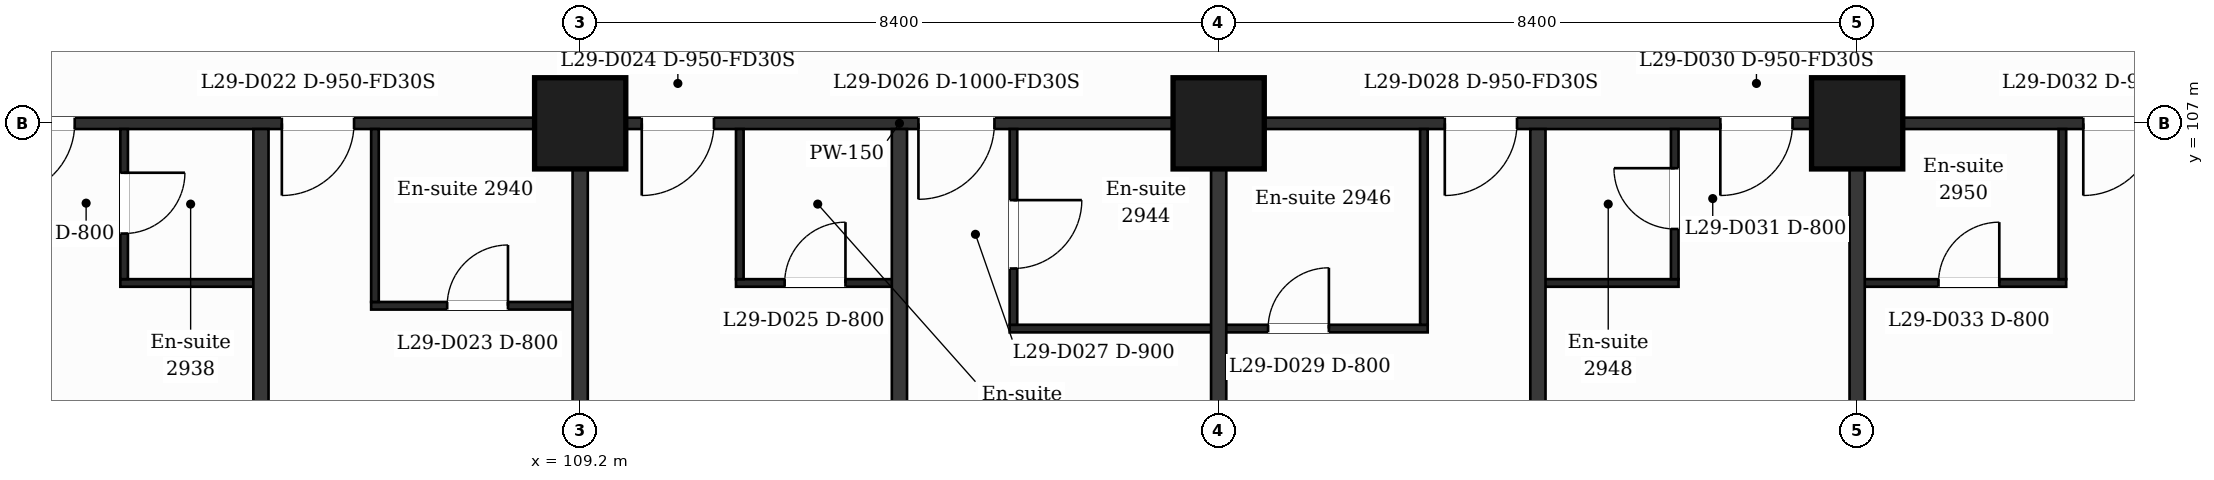
"""IFC4 building model, lengths in metres.
Left out: names, types, materials, properties, quantities, classifications, styles, units other than length and angle.
Written with IfcOpenShell. Run it as: python <this file> out.ifc"""

import sys

from ifc_helpers import new_model, si_unit, direction, frame, frame_2d, origin, origin_2d, place, context, subcontext, project, spatial, rectangle, extrude, element, fill, save


model = new_model("IFC4")
c1 = context("Model", 3, precision=1e-05, world=origin(), true_north=direction((0.0, 1.0)))
c2 = subcontext(c1, "Body", "Model", "MODEL_VIEW")
j1 = project(units=[si_unit("LENGTHUNIT", "METRE"), si_unit("PLANEANGLEUNIT", "RADIAN")], contexts=[c1])
p1 = place(None, origin())
s1 = spatial("IfcSite", under=j1, at=p1, CompositionType="ELEMENT")
p2 = place(p1, origin())
s2 = spatial("IfcBuilding", under=s1, at=p2, CompositionType="ELEMENT")
p3 = place(p2, frame((0.0, 0.0, 124.3)))
s3 = spatial("IfcBuildingStorey", under=s2, at=p3, CompositionType="ELEMENT", Elevation=124.3)
for number, where, z_axis, x_axis in (
    (1, (109.2, 107.0, 0.0), (0.0, 0.0, 1.0), (1.0, 0.0, 0.0)),
    (2, (117.6, 107.0, 0.0), (0.0, 0.0, 1.0), (1.0, 0.0, 0.0)),
    (3, (126.0, 107.0, 0.0), (0.0, 0.0, 1.0), (1.0, 0.0, 0.0)),
):
    element("IfcColumn", number, at=place(p3, frame(where, z_axis=z_axis, x_axis=x_axis)), inside=s3, PredefinedType="COLUMN", context=c2, shape_type="SweptSolid", body=[
        extrude(rectangle(XDim=1.2, YDim=1.2, at=origin_2d()), origin(), (0.0, 0.0, 1.0), 3.7),
    ])
p4 = place(p3, frame((114.85, 104.3, 0.0), z_axis=(0.0, 0.0, 1.0), x_axis=(1.0, 0.0, 0.0)))
e4 = element("IfcWall", 4, at=p4, inside=s3, PredefinedType="PARTITIONING", context=c2, shape_type="SweptSolid", body=[
    extrude(rectangle(XDim=5.5, YDim=0.1, at=frame_2d((2.75, 0.0))), origin(), (0.0, 0.0, 1.0), 3.38),
])
p5 = place(p4, frame((3.4, 0.0, 0.0)))
e5 = element("IfcOpeningElement", 5, at=p5, cuts=e4, PredefinedType="OPENING", context=c2, shape_type="SweptSolid", body=[
    extrude(rectangle(XDim=0.8, YDim=2.1, at=frame_2d((0.4, 1.05))), frame((0.0, 0.06, 0.0), z_axis=(0.0, -1.0, 0.0), x_axis=(1.0, 0.0, 0.0)), (0.0, 0.0, 1.0), 0.12),
])
p6 = place(p3, frame((106.45, 104.6, 0.0), z_axis=(0.0, 0.0, 1.0), x_axis=(1.0, 0.0, 0.0)))
e6 = element("IfcWall", 6, at=p6, inside=s3, PredefinedType="PARTITIONING", context=c2, shape_type="SweptSolid", body=[
    extrude(rectangle(XDim=2.75, YDim=0.1, at=frame_2d((1.375, 0.0))), origin(), (0.0, 0.0, 1.0), 3.38),
])
p7 = place(p6, frame((1.0, 0.0, 0.0)))
e7 = element("IfcOpeningElement", 7, at=p7, cuts=e6, PredefinedType="OPENING", context=c2, shape_type="SweptSolid", body=[
    extrude(rectangle(XDim=0.8, YDim=2.1, at=frame_2d((0.4, 1.05))), frame((0.0, 0.06, 0.0), z_axis=(0.0, -1.0, 0.0), x_axis=(1.0, 0.0, 0.0)), (0.0, 0.0, 1.0), 0.12),
])
p8 = place(p3, frame((103.15, 104.9, 0.0), z_axis=(0.0, 0.0, 1.0), x_axis=(1.0, 0.0, 0.0)))
e8 = element("IfcWall", 8, at=p8, inside=s3, PredefinedType="PARTITIONING", context=c2, shape_type="SweptSolid", body=[
    extrude(rectangle(XDim=1.85, YDim=0.1, at=frame_2d((0.925, 0.0))), origin(), (0.0, 0.0, 1.0), 3.38),
])
p9 = place(p3, frame((111.25, 104.9, 0.0), z_axis=(0.0, 0.0, 1.0), x_axis=(1.0, 0.0, 0.0)))
e9 = element("IfcWall", 9, at=p9, inside=s3, PredefinedType="PARTITIONING", context=c2, shape_type="SweptSolid", body=[
    extrude(rectangle(XDim=2.15, YDim=0.1, at=frame_2d((1.075, 0.0))), origin(), (0.0, 0.0, 1.0), 3.38),
])
p10 = place(p9, frame((0.64, 0.0, 0.0)))
e10 = element("IfcOpeningElement", 10, at=p10, cuts=e9, PredefinedType="OPENING", context=c2, shape_type="SweptSolid", body=[
    extrude(rectangle(XDim=0.8, YDim=2.1, at=frame_2d((0.4, 1.05))), frame((0.0, 0.06, 0.0), z_axis=(0.0, -1.0, 0.0), x_axis=(1.0, 0.0, 0.0)), (0.0, 0.0, 1.0), 0.12),
])
p11 = place(p3, frame((121.8, 104.9, 0.0), z_axis=(0.0, 0.0, 1.0), x_axis=(1.0, 0.0, 0.0)))
e11 = element("IfcWall", 11, at=p11, inside=s3, PredefinedType="PARTITIONING", context=c2, shape_type="SweptSolid", body=[
    extrude(rectangle(XDim=1.85, YDim=0.1, at=frame_2d((0.925, 0.0))), origin(), (0.0, 0.0, 1.0), 3.38),
])
p12 = place(p3, frame((126.0, 104.9, 0.0), z_axis=(0.0, 0.0, 1.0), x_axis=(1.0, 0.0, 0.0)))
e12 = element("IfcWall", 12, at=p12, inside=s3, PredefinedType="PARTITIONING", context=c2, shape_type="SweptSolid", body=[
    extrude(rectangle(XDim=2.75, YDim=0.1, at=frame_2d((1.375, 0.0))), origin(), (0.0, 0.0, 1.0), 3.38),
])
p13 = place(p12, frame((1.07, 0.0, 0.0)))
e13 = element("IfcOpeningElement", 13, at=p13, cuts=e12, PredefinedType="OPENING", context=c2, shape_type="SweptSolid", body=[
    extrude(rectangle(XDim=0.8, YDim=2.1, at=frame_2d((0.4, 1.05))), frame((0.0, 0.06, 0.0), z_axis=(0.0, -1.0, 0.0), x_axis=(1.0, 0.0, 0.0)), (0.0, 0.0, 1.0), 0.12),
])
p14 = place(p3, frame((87.018, 107.0, 0.0), z_axis=(0.0, 0.0, 1.0), x_axis=(1.0, 0.0, 0.0)))
e14 = element("IfcWall", 14, at=p14, inside=s3, PredefinedType="PARTITIONING", context=c2, shape_type="SweptSolid", body=[
    extrude(rectangle(XDim=52.765, YDim=0.15, at=frame_2d((26.382, 0.0))), origin(), (0.0, 0.0, 1.0), 3.38),
])
p15 = place(p14, frame((1.276, 0.0, 0.0)))
e15 = element("IfcOpeningElement", 15, at=p15, cuts=e14, PredefinedType="OPENING", context=c2, shape_type="SweptSolid", body=[
    extrude(rectangle(XDim=0.95, YDim=2.1, at=frame_2d((0.475, 1.05))), frame((0.0, 0.085, 0.0), z_axis=(0.0, -1.0, 0.0), x_axis=(1.0, 0.0, 0.0)), (0.0, 0.0, 1.0), 0.17),
])
p16 = place(p14, frame((6.192, 0.0, 0.0)))
e16 = element("IfcOpeningElement", 16, at=p16, cuts=e14, PredefinedType="OPENING", context=c2, shape_type="SweptSolid", body=[
    extrude(rectangle(XDim=0.95, YDim=2.1, at=frame_2d((0.475, 1.05))), frame((0.0, 0.085, 0.0), z_axis=(0.0, -1.0, 0.0), x_axis=(1.0, 0.0, 0.0)), (0.0, 0.0, 1.0), 0.17),
])
p17 = place(p14, frame((11.982, 0.0, 0.0)))
e17 = element("IfcOpeningElement", 17, at=p17, cuts=e14, PredefinedType="OPENING", context=c2, shape_type="SweptSolid", body=[
    extrude(rectangle(XDim=1.0, YDim=2.1, at=frame_2d((0.5, 1.05))), frame((0.0, 0.085, 0.0), z_axis=(0.0, -1.0, 0.0), x_axis=(1.0, 0.0, 0.0)), (0.0, 0.0, 1.0), 0.17),
])
p18 = place(p14, frame((14.582, 0.0, 0.0)))
e18 = element("IfcOpeningElement", 18, at=p18, cuts=e14, PredefinedType="OPENING", context=c2, shape_type="SweptSolid", body=[
    extrude(rectangle(XDim=0.95, YDim=2.1, at=frame_2d((0.475, 1.05))), frame((0.0, 0.085, 0.0), z_axis=(0.0, -1.0, 0.0), x_axis=(1.0, 0.0, 0.0)), (0.0, 0.0, 1.0), 0.17),
])
p19 = place(p14, frame((18.257, 0.0, 0.0)))
e19 = element("IfcOpeningElement", 19, at=p19, cuts=e14, PredefinedType="OPENING", context=c2, shape_type="SweptSolid", body=[
    extrude(rectangle(XDim=0.95, YDim=2.1, at=frame_2d((0.475, 1.05))), frame((0.0, 0.085, 0.0), z_axis=(0.0, -1.0, 0.0), x_axis=(1.0, 0.0, 0.0)), (0.0, 0.0, 1.0), 0.17),
])
p20 = place(p14, frame((22.992, 0.0, 0.0)))
e20 = element("IfcOpeningElement", 20, at=p20, cuts=e14, PredefinedType="OPENING", context=c2, shape_type="SweptSolid", body=[
    extrude(rectangle(XDim=0.95, YDim=2.1, at=frame_2d((0.475, 1.05))), frame((0.0, 0.085, 0.0), z_axis=(0.0, -1.0, 0.0), x_axis=(1.0, 0.0, 0.0)), (0.0, 0.0, 1.0), 0.17),
])
p21 = place(p14, frame((26.632, 0.0, 0.0)))
e21 = element("IfcOpeningElement", 21, at=p21, cuts=e14, PredefinedType="OPENING", context=c2, shape_type="SweptSolid", body=[
    extrude(rectangle(XDim=1.0, YDim=2.1, at=frame_2d((0.5, 1.05))), frame((0.0, 0.085, 0.0), z_axis=(0.0, -1.0, 0.0), x_axis=(1.0, 0.0, 0.0)), (0.0, 0.0, 1.0), 0.17),
])
p22 = place(p14, frame((33.557, 0.0, 0.0)))
e22 = element("IfcOpeningElement", 22, at=p22, cuts=e14, PredefinedType="OPENING", context=c2, shape_type="SweptSolid", body=[
    extrude(rectangle(XDim=0.95, YDim=2.1, at=frame_2d((0.475, 1.05))), frame((0.0, 0.085, 0.0), z_axis=(0.0, -1.0, 0.0), x_axis=(1.0, 0.0, 0.0)), (0.0, 0.0, 1.0), 0.17),
])
p23 = place(p14, frame((37.182, 0.0, 0.0)))
e23 = element("IfcOpeningElement", 23, at=p23, cuts=e14, PredefinedType="OPENING", context=c2, shape_type="SweptSolid", body=[
    extrude(rectangle(XDim=0.95, YDim=2.1, at=frame_2d((0.475, 1.05))), frame((0.0, 0.085, 0.0), z_axis=(0.0, -1.0, 0.0), x_axis=(1.0, 0.0, 0.0)), (0.0, 0.0, 1.0), 0.17),
])
p24 = place(p14, frame((41.957, 0.0, 0.0)))
e24 = element("IfcOpeningElement", 24, at=p24, cuts=e14, PredefinedType="OPENING", context=c2, shape_type="SweptSolid", body=[
    extrude(rectangle(XDim=0.95, YDim=2.1, at=frame_2d((0.475, 1.05))), frame((0.0, 0.085, 0.0), z_axis=(0.0, -1.0, 0.0), x_axis=(1.0, 0.0, 0.0)), (0.0, 0.0, 1.0), 0.17),
])
p25 = place(p14, frame((45.622, 0.0, 0.0)))
e25 = element("IfcOpeningElement", 25, at=p25, cuts=e14, PredefinedType="OPENING", context=c2, shape_type="SweptSolid", body=[
    extrude(rectangle(XDim=0.95, YDim=2.1, at=frame_2d((0.475, 1.05))), frame((0.0, 0.085, 0.0), z_axis=(0.0, -1.0, 0.0), x_axis=(1.0, 0.0, 0.0)), (0.0, 0.0, 1.0), 0.17),
])
p26 = place(p14, frame((48.56, 0.0, 0.0)))
e26 = element("IfcOpeningElement", 26, at=p26, cuts=e14, PredefinedType="OPENING", context=c2, shape_type="SweptSolid", body=[
    extrude(rectangle(XDim=0.95, YDim=2.1, at=frame_2d((0.475, 1.05))), frame((0.0, 0.085, 0.0), z_axis=(0.0, -1.0, 0.0), x_axis=(1.0, 0.0, 0.0)), (0.0, 0.0, 1.0), 0.17),
])
p27 = place(p3, frame((103.2, 104.95, 0.0), z_axis=(0.0, 0.0, 1.0), x_axis=(0.0, 1.0, 0.0)))
e27 = element("IfcWall", 27, at=p27, inside=s3, PredefinedType="PARTITIONING", context=c2, shape_type="SweptSolid", body=[
    extrude(rectangle(XDim=1.975, YDim=0.1, at=frame_2d((0.988, 0.0))), origin(), (0.0, 0.0, 1.0), 3.38),
])
p28 = place(p27, frame((0.6, 0.0, 0.0)))
e28 = element("IfcOpeningElement", 28, at=p28, cuts=e27, PredefinedType="OPENING", context=c2, shape_type="SweptSolid", body=[
    extrude(rectangle(XDim=0.8, YDim=2.1, at=frame_2d((0.4, 1.05))), frame((0.0, 0.06, 0.0), z_axis=(0.0, -1.0, 0.0), x_axis=(1.0, 0.0, 0.0)), (0.0, 0.0, 1.0), 0.12),
])
p29 = place(p3, frame((105.0, 99.79, 0.0), z_axis=(0.0, 0.0, 1.0), x_axis=(0.0, 1.0, 0.0)))
e29 = element("IfcWall", 29, at=p29, inside=s3, PredefinedType="PARTITIONING", context=c2, shape_type="SweptSolid", body=[
    extrude(rectangle(XDim=7.135, YDim=0.2, at=frame_2d((3.567, 0.0))), origin(), (0.0, 0.0, 1.0), 3.38),
])
p30 = place(p3, frame((106.5, 104.65, 0.0), z_axis=(0.0, 0.0, 1.0), x_axis=(0.0, 1.0, 0.0)))
e30 = element("IfcWall", 30, at=p30, inside=s3, PredefinedType="PARTITIONING", context=c2, shape_type="SweptSolid", body=[
    extrude(rectangle(XDim=2.275, YDim=0.1, at=frame_2d((1.138, 0.0))), origin(), (0.0, 0.0, 1.0), 3.38),
])
p31 = place(p3, frame((109.2, 99.79, 0.0), z_axis=(0.0, 0.0, 1.0), x_axis=(0.0, 1.0, 0.0)))
e31 = element("IfcWall", 31, at=p31, inside=s3, PredefinedType="PARTITIONING", context=c2, shape_type="SweptSolid", body=[
    extrude(rectangle(XDim=7.135, YDim=0.2, at=frame_2d((3.567, 0.0))), origin(), (0.0, 0.0, 1.0), 3.38),
])
p32 = place(p3, frame((111.3, 104.95, 0.0), z_axis=(0.0, 0.0, 1.0), x_axis=(0.0, 1.0, 0.0)))
e32 = element("IfcWall", 32, at=p32, inside=s3, PredefinedType="PARTITIONING", context=c2, shape_type="SweptSolid", body=[
    extrude(rectangle(XDim=1.975, YDim=0.1, at=frame_2d((0.988, 0.0))), origin(), (0.0, 0.0, 1.0), 3.38),
])
p33 = place(p3, frame((113.4, 99.79, 0.0), z_axis=(0.0, 0.0, 1.0), x_axis=(0.0, 1.0, 0.0)))
e33 = element("IfcWall", 33, at=p33, inside=s3, PredefinedType="PARTITIONING", context=c2, shape_type="SweptSolid", body=[
    extrude(rectangle(XDim=7.135, YDim=0.2, at=frame_2d((3.567, 0.0))), origin(), (0.0, 0.0, 1.0), 3.38),
])
p34 = place(p3, frame((114.9, 104.35, 0.0), z_axis=(0.0, 0.0, 1.0), x_axis=(0.0, 1.0, 0.0)))
e34 = element("IfcWall", 34, at=p34, inside=s3, PredefinedType="PARTITIONING", context=c2, shape_type="SweptSolid", body=[
    extrude(rectangle(XDim=2.575, YDim=0.1, at=frame_2d((1.288, 0.0))), origin(), (0.0, 0.0, 1.0), 3.38),
])
p35 = place(p34, frame((0.74, 0.0, 0.0)))
e35 = element("IfcOpeningElement", 35, at=p35, cuts=e34, PredefinedType="OPENING", context=c2, shape_type="SweptSolid", body=[
    extrude(rectangle(XDim=0.9, YDim=2.1, at=frame_2d((0.45, 1.05))), frame((0.0, 0.06, 0.0), z_axis=(0.0, -1.0, 0.0), x_axis=(1.0, 0.0, 0.0)), (0.0, 0.0, 1.0), 0.12),
])
p36 = place(p3, frame((117.6, 99.79, 0.0), z_axis=(0.0, 0.0, 1.0), x_axis=(0.0, 1.0, 0.0)))
e36 = element("IfcWall", 36, at=p36, inside=s3, PredefinedType="PARTITIONING", context=c2, shape_type="SweptSolid", body=[
    extrude(rectangle(XDim=7.135, YDim=0.2, at=frame_2d((3.567, 0.0))), origin(), (0.0, 0.0, 1.0), 3.38),
])
p37 = place(p3, frame((120.3, 104.35, 0.0), z_axis=(0.0, 0.0, 1.0), x_axis=(0.0, 1.0, 0.0)))
e37 = element("IfcWall", 37, at=p37, inside=s3, PredefinedType="PARTITIONING", context=c2, shape_type="SweptSolid", body=[
    extrude(rectangle(XDim=2.575, YDim=0.1, at=frame_2d((1.288, 0.0))), origin(), (0.0, 0.0, 1.0), 3.38),
])
p38 = place(p3, frame((121.8, 99.79, 0.0), z_axis=(0.0, 0.0, 1.0), x_axis=(0.0, 1.0, 0.0)))
e38 = element("IfcWall", 38, at=p38, inside=s3, PredefinedType="PARTITIONING", context=c2, shape_type="SweptSolid", body=[
    extrude(rectangle(XDim=7.135, YDim=0.2, at=frame_2d((3.567, 0.0))), origin(), (0.0, 0.0, 1.0), 3.38),
])
p39 = place(p3, frame((123.6, 104.95, 0.0), z_axis=(0.0, 0.0, 1.0), x_axis=(0.0, 1.0, 0.0)))
e39 = element("IfcWall", 39, at=p39, inside=s3, PredefinedType="PARTITIONING", context=c2, shape_type="SweptSolid", body=[
    extrude(rectangle(XDim=1.975, YDim=0.1, at=frame_2d((0.988, 0.0))), origin(), (0.0, 0.0, 1.0), 3.38),
])
p40 = place(p39, frame((0.66, 0.0, 0.0)))
e40 = element("IfcOpeningElement", 40, at=p40, cuts=e39, PredefinedType="OPENING", context=c2, shape_type="SweptSolid", body=[
    extrude(rectangle(XDim=0.8, YDim=2.1, at=frame_2d((0.4, 1.05))), frame((0.0, 0.06, 0.0), z_axis=(0.0, -1.0, 0.0), x_axis=(1.0, 0.0, 0.0)), (0.0, 0.0, 1.0), 0.12),
])
p41 = place(p3, frame((126.0, 99.79, 0.0), z_axis=(0.0, 0.0, 1.0), x_axis=(0.0, 1.0, 0.0)))
e41 = element("IfcWall", 41, at=p41, inside=s3, PredefinedType="PARTITIONING", context=c2, shape_type="SweptSolid", body=[
    extrude(rectangle(XDim=7.135, YDim=0.2, at=frame_2d((3.567, 0.0))), origin(), (0.0, 0.0, 1.0), 3.38),
])
p42 = place(p3, frame((128.7, 104.95, 0.0), z_axis=(0.0, 0.0, 1.0), x_axis=(0.0, 1.0, 0.0)))
e42 = element("IfcWall", 42, at=p42, inside=s3, PredefinedType="PARTITIONING", context=c2, shape_type="SweptSolid", body=[
    extrude(rectangle(XDim=1.975, YDim=0.1, at=frame_2d((0.988, 0.0))), origin(), (0.0, 0.0, 1.0), 3.38),
])
p43 = place(p18, origin())
e43 = element("IfcDoor", 43, at=p43, inside=s3, OperationType="SINGLE_SWING_LEFT", PredefinedType="DOOR", context=c2, shape_type="SweptSolid", body=[
    extrude(rectangle(XDim=0.95, YDim=2.1, at=frame_2d((0.475, 1.05))), frame((0.0, 0.025, 0.0), z_axis=(0.0, -1.0, 0.0), x_axis=(1.0, 0.0, 0.0)), (0.0, 0.0, 1.0), 0.05),
])
fill(e18, e43)
p44 = place(p28, origin())
e44 = element("IfcDoor", 44, at=p44, inside=s3, OperationType="SINGLE_SWING_RIGHT", PredefinedType="DOOR", context=c2, shape_type="SweptSolid", body=[
    extrude(rectangle(XDim=0.8, YDim=2.1, at=frame_2d((0.4, 1.05))), frame((0.0, 0.025, 0.0), z_axis=(0.0, -1.0, 0.0), x_axis=(1.0, 0.0, 0.0)), (0.0, 0.0, 1.0), 0.05),
])
fill(e28, e44)
p45 = place(p19, origin())
e45 = element("IfcDoor", 45, at=p45, inside=s3, OperationType="SINGLE_SWING_LEFT", PredefinedType="DOOR", context=c2, shape_type="SweptSolid", body=[
    extrude(rectangle(XDim=0.95, YDim=2.1, at=frame_2d((0.475, 1.05))), frame((0.0, 0.025, 0.0), z_axis=(0.0, -1.0, 0.0), x_axis=(1.0, 0.0, 0.0)), (0.0, 0.0, 1.0), 0.05),
])
fill(e19, e45)
p46 = place(p7, origin())
e46 = element("IfcDoor", 46, at=p46, inside=s3, OperationType="SINGLE_SWING_RIGHT", PredefinedType="DOOR", context=c2, shape_type="SweptSolid", body=[
    extrude(rectangle(XDim=0.8, YDim=2.1, at=frame_2d((0.4, 1.05))), frame((0.0, 0.025, 0.0), z_axis=(0.0, -1.0, 0.0), x_axis=(1.0, 0.0, 0.0)), (0.0, 0.0, 1.0), 0.05),
])
fill(e7, e46)
p47 = place(p20, origin())
e47 = element("IfcDoor", 47, at=p47, inside=s3, OperationType="SINGLE_SWING_LEFT", PredefinedType="DOOR", context=c2, shape_type="SweptSolid", body=[
    extrude(rectangle(XDim=0.95, YDim=2.1, at=frame_2d((0.475, 1.05))), frame((0.0, 0.025, 0.0), z_axis=(0.0, -1.0, 0.0), x_axis=(1.0, 0.0, 0.0)), (0.0, 0.0, 1.0), 0.05),
])
fill(e20, e47)
p48 = place(p10, origin())
e48 = element("IfcDoor", 48, at=p48, inside=s3, OperationType="SINGLE_SWING_RIGHT", PredefinedType="DOOR", context=c2, shape_type="SweptSolid", body=[
    extrude(rectangle(XDim=0.8, YDim=2.1, at=frame_2d((0.4, 1.05))), frame((0.0, 0.025, 0.0), z_axis=(0.0, -1.0, 0.0), x_axis=(1.0, 0.0, 0.0)), (0.0, 0.0, 1.0), 0.05),
])
fill(e10, e48)
p49 = place(p21, origin())
e49 = element("IfcDoor", 49, at=p49, inside=s3, OperationType="SINGLE_SWING_LEFT", PredefinedType="DOOR", context=c2, shape_type="SweptSolid", body=[
    extrude(rectangle(XDim=1.0, YDim=2.1, at=frame_2d((0.5, 1.05))), frame((0.0, 0.025, 0.0), z_axis=(0.0, -1.0, 0.0), x_axis=(1.0, 0.0, 0.0)), (0.0, 0.0, 1.0), 0.05),
])
fill(e21, e49)
p50 = place(p35, origin())
e50 = element("IfcDoor", 50, at=p50, inside=s3, OperationType="SINGLE_SWING_RIGHT", PredefinedType="DOOR", context=c2, shape_type="SweptSolid", body=[
    extrude(rectangle(XDim=0.9, YDim=2.1, at=frame_2d((0.45, 1.05))), frame((0.0, 0.025, 0.0), z_axis=(0.0, -1.0, 0.0), x_axis=(1.0, 0.0, 0.0)), (0.0, 0.0, 1.0), 0.05),
])
fill(e35, e50)
p51 = place(p22, origin())
e51 = element("IfcDoor", 51, at=p51, inside=s3, OperationType="SINGLE_SWING_LEFT", PredefinedType="DOOR", context=c2, shape_type="SweptSolid", body=[
    extrude(rectangle(XDim=0.95, YDim=2.1, at=frame_2d((0.475, 1.05))), frame((0.0, 0.025, 0.0), z_axis=(0.0, -1.0, 0.0), x_axis=(1.0, 0.0, 0.0)), (0.0, 0.0, 1.0), 0.05),
])
fill(e22, e51)
p52 = place(p5, origin())
e52 = element("IfcDoor", 52, at=p52, inside=s3, OperationType="SINGLE_SWING_RIGHT", PredefinedType="DOOR", context=c2, shape_type="SweptSolid", body=[
    extrude(rectangle(XDim=0.8, YDim=2.1, at=frame_2d((0.4, 1.05))), frame((0.0, 0.025, 0.0), z_axis=(0.0, -1.0, 0.0), x_axis=(1.0, 0.0, 0.0)), (0.0, 0.0, 1.0), 0.05),
])
fill(e5, e52)
p53 = place(p23, origin())
e53 = element("IfcDoor", 53, at=p53, inside=s3, OperationType="SINGLE_SWING_LEFT", PredefinedType="DOOR", context=c2, shape_type="SweptSolid", body=[
    extrude(rectangle(XDim=0.95, YDim=2.1, at=frame_2d((0.475, 1.05))), frame((0.0, 0.025, 0.0), z_axis=(0.0, -1.0, 0.0), x_axis=(1.0, 0.0, 0.0)), (0.0, 0.0, 1.0), 0.05),
])
fill(e23, e53)
p54 = place(p40, origin())
e54 = element("IfcDoor", 54, at=p54, inside=s3, OperationType="SINGLE_SWING_RIGHT", PredefinedType="DOOR", context=c2, shape_type="SweptSolid", body=[
    extrude(rectangle(XDim=0.8, YDim=2.1, at=frame_2d((0.4, 1.05))), frame((0.0, 0.025, 0.0), z_axis=(0.0, -1.0, 0.0), x_axis=(1.0, 0.0, 0.0)), (0.0, 0.0, 1.0), 0.05),
])
fill(e40, e54)
p55 = place(p24, origin())
e55 = element("IfcDoor", 55, at=p55, inside=s3, OperationType="SINGLE_SWING_LEFT", PredefinedType="DOOR", context=c2, shape_type="SweptSolid", body=[
    extrude(rectangle(XDim=0.95, YDim=2.1, at=frame_2d((0.475, 1.05))), frame((0.0, 0.025, 0.0), z_axis=(0.0, -1.0, 0.0), x_axis=(1.0, 0.0, 0.0)), (0.0, 0.0, 1.0), 0.05),
])
fill(e24, e55)
p56 = place(p13, origin())
e56 = element("IfcDoor", 56, at=p56, inside=s3, OperationType="SINGLE_SWING_RIGHT", PredefinedType="DOOR", context=c2, shape_type="SweptSolid", body=[
    extrude(rectangle(XDim=0.8, YDim=2.1, at=frame_2d((0.4, 1.05))), frame((0.0, 0.025, 0.0), z_axis=(0.0, -1.0, 0.0), x_axis=(1.0, 0.0, 0.0)), (0.0, 0.0, 1.0), 0.05),
])
fill(e13, e56)
save(model, sys.argv[1])
